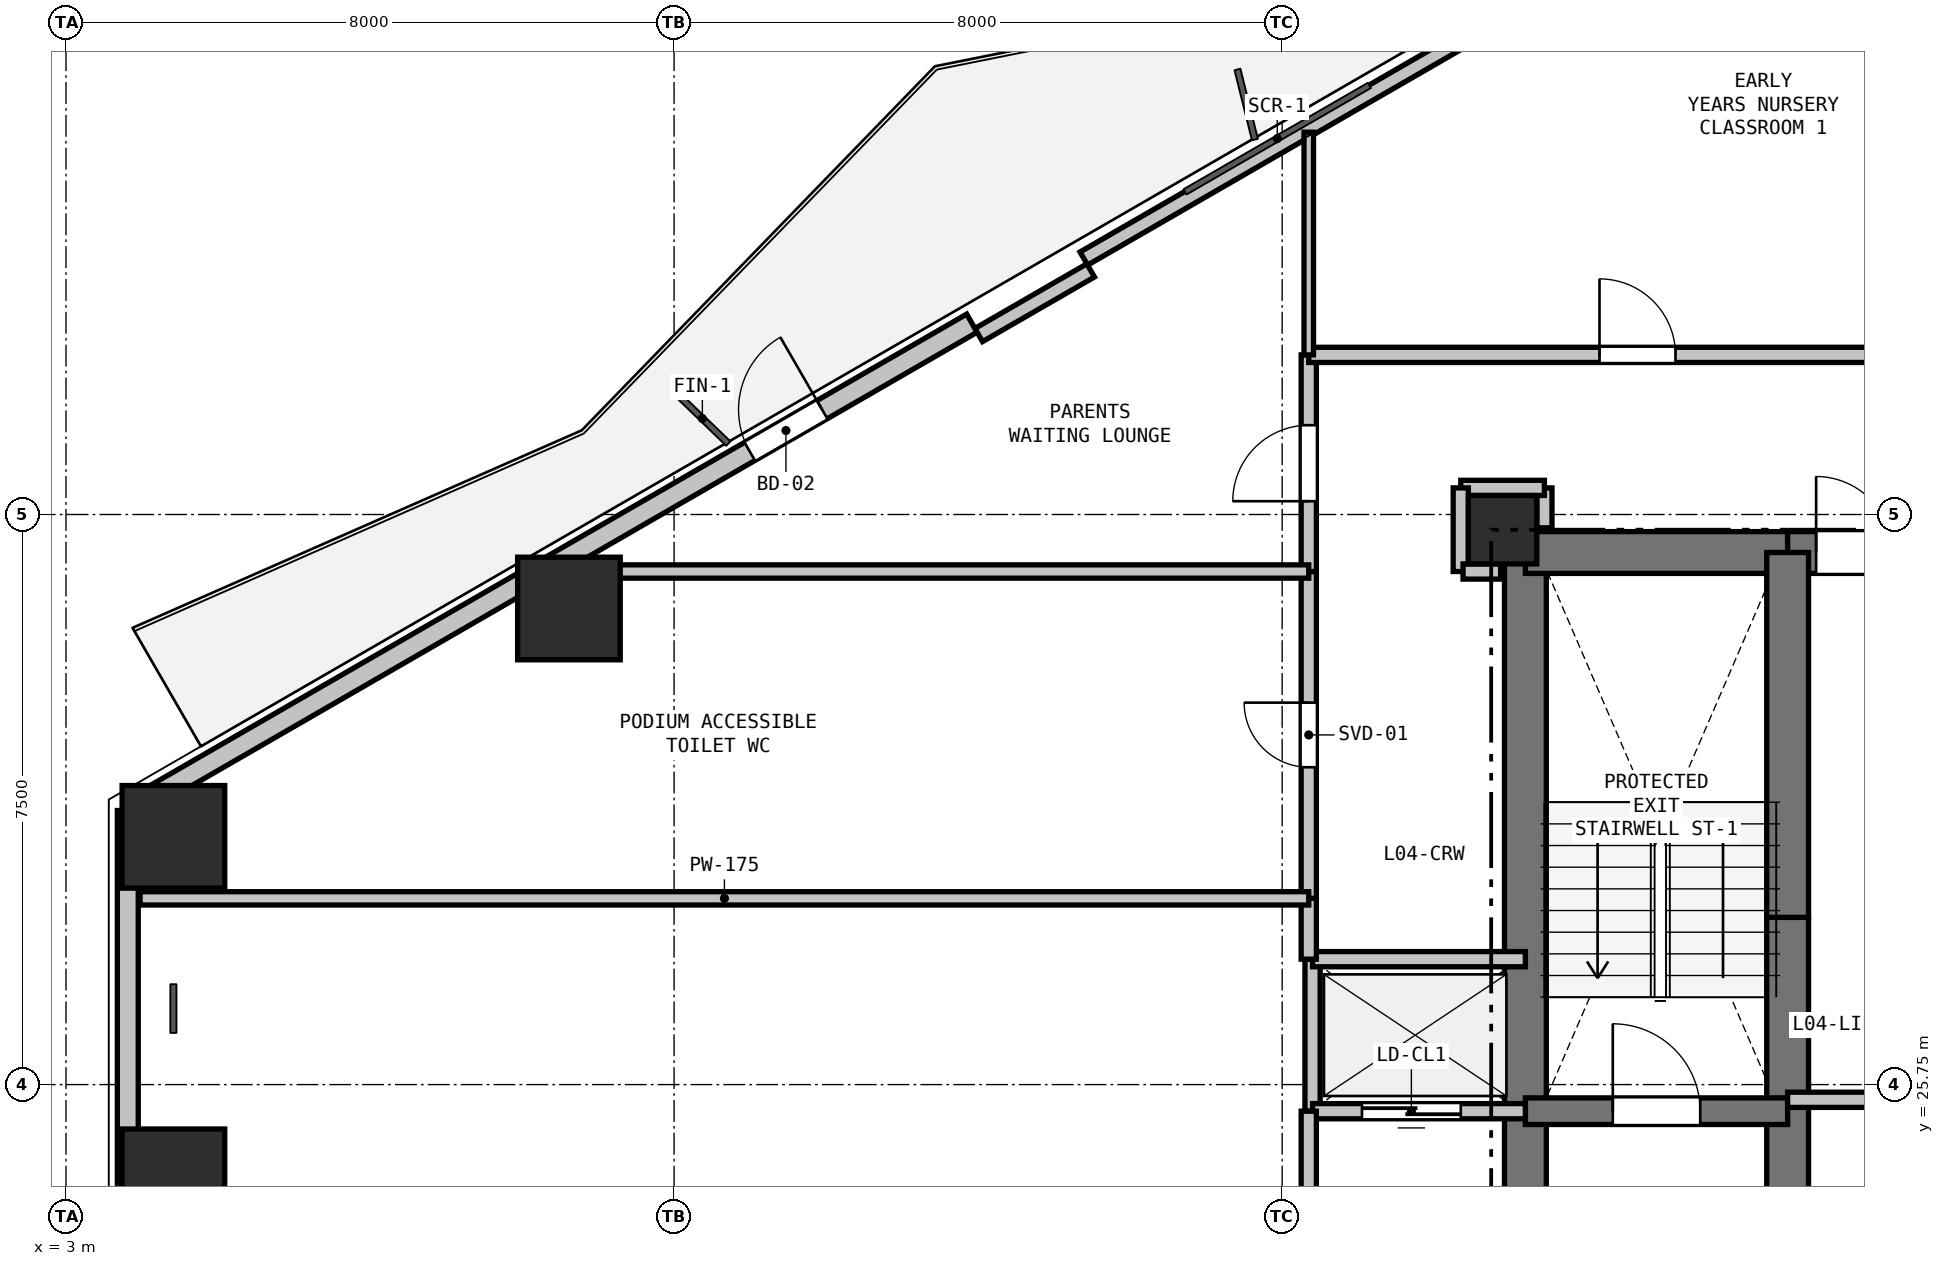
"""IFC4 building model, lengths in metres.
Left out: names, types, materials, properties, quantities, classifications, styles, units other than length and angle.
Written with IfcOpenShell. Run it as: python <this file> out.ifc"""

import sys

from ifc_helpers import new_model, si_unit, direction, frame, frame_2d, origin, origin_2d, place, context, subcontext, project, spatial, rectangle, hollow_rectangle, extrude, element, fill, save


model = new_model("IFC4")
c1 = context("Model", 3, precision=1e-05, world=origin(), true_north=direction((0.0, 1.0)))
c2 = subcontext(c1, "Body", "Model", "MODEL_VIEW")
j1 = project(units=[si_unit("LENGTHUNIT", "METRE"), si_unit("PLANEANGLEUNIT", "RADIAN")], contexts=[c1])
p1 = place(None, origin())
s1 = spatial("IfcSite", under=j1, at=p1, CompositionType="ELEMENT")
p2 = place(p1, origin())
s2 = spatial("IfcBuilding", under=s1, at=p2, CompositionType="ELEMENT")
p3 = place(p2, frame((0.0, 0.0, 19.2)))
s3 = spatial("IfcBuildingStorey", under=s2, at=p3, CompositionType="ELEMENT", Elevation=19.2)
p4 = place(p3, frame((21.9, 33.05, 0.0), z_axis=(0.0, 0.0, 1.0), x_axis=(1.0, 0.0, 0.0)))
e1 = element("IfcColumn", 1, at=p4, inside=s3, PredefinedType="COLUMN", context=c2, shape_type="SweptSolid", body=[
    extrude(rectangle(XDim=0.9, YDim=0.9, at=origin_2d()), origin(), (0.0, 0.0, 1.0), 3.3),
])
for number, where, z_axis, x_axis in (
    (2, (4.413, 29.009, 0.0), (0.0, 0.0, 1.0), (1.0, 0.0, 0.0)),
    (3, (9.617, 32.014, 0.0), (0.0, 0.0, 1.0), (1.0, 0.0, 0.0)),
    (4, (4.413, 24.491, 0.0), (0.0, 0.0, 1.0), (1.0, 0.0, 0.0)),
):
    element("IfcColumn", number, at=place(p3, frame(where, z_axis=z_axis, x_axis=x_axis)), inside=s3, PredefinedType="COLUMN", context=c2, shape_type="SweptSolid", body=[
        extrude(hollow_rectangle(XDim=1.35, YDim=1.35, WallThickness=0.036, at=origin_2d()), origin(), (0.0, 0.0, 1.0), 3.3),
    ])
p5 = place(p3, frame((3.813, 24.144, 0.0), z_axis=(0.0, 0.0, 1.0), x_axis=(0.0, 1.0, 0.0)))
e5 = element("IfcWall", 5, at=p5, inside=s3, PredefinedType="SOLIDWALL", context=c2, shape_type="SweptSolid", body=[
    extrude(rectangle(XDim=5.211, YDim=0.275, at=frame_2d((2.606, 0.0))), origin(), (0.0, 0.0, 1.0), 2.66),
])
p6 = place(p3, frame((3.943, 29.431, 0.0), z_axis=(0.0, 0.0, 1.0), x_axis=(0.866027105532, 0.499997052475, 0.0)))
e6 = element("IfcWall", 6, at=p6, inside=s3, PredefinedType="SOLIDWALL", context=c2, shape_type="SweptSolid", body=[
    extrude(rectangle(XDim=12.673, YDim=0.275, at=frame_2d((6.336, 0.0))), origin(), (0.0, 0.0, 1.0), 2.66),
])
p7 = place(p6, frame((9.298, 0.0, 0.0)))
e7 = element("IfcOpeningElement", 7, at=p7, cuts=e6, PredefinedType="OPENING", context=c2, shape_type="SweptSolid", body=[
    extrude(rectangle(XDim=1.1, YDim=2.1, at=frame_2d((0.55, 1.05))), frame((0.0, 0.147, 0.0), z_axis=(0.0, -1.0, 0.0), x_axis=(1.0, 0.0, 0.0)), (0.0, 0.0, 1.0), 0.295),
])
p8 = place(p3, frame((16.39, 36.617, 0.0), z_axis=(0.0, 0.0, 1.0), x_axis=(0.866027351828, 0.499996625875, 0.0)))
e8 = element("IfcWall", 8, at=p8, inside=s3, PredefinedType="PARAPET", context=c2, shape_type="SweptSolid", body=[
    extrude(rectangle(XDim=11.973, YDim=0.2, at=frame_2d((5.987, 0.0))), origin(), (0.0, 0.0, 1.0), 0.2),
])
p9 = place(p3, frame((15.008, 35.611, 0.0), z_axis=(0.0, 0.0, 1.0), x_axis=(0.86605165483, 0.499954529098, 0.0)))
e9 = element("IfcWall", 9, at=p9, inside=s3, PredefinedType="PARAPET", context=c2, shape_type="SweptSolid", body=[
    extrude(rectangle(XDim=1.7, YDim=0.2, at=frame_2d((0.85, 0.0))), origin(), (0.0, 0.0, 1.0), 2.66),
])
p10 = place(p3, frame((22.2, 20.75, 0.0), z_axis=(0.0, 0.0, 1.0), x_axis=(0.0, 1.0, 0.0)))
e10 = element("IfcWall", 10, at=p10, inside=s3, PredefinedType="SHEAR", context=c2, shape_type="SweptSolid", body=[
    extrude(rectangle(XDim=4.65, YDim=0.55, at=frame_2d((2.325, 0.0))), origin(), (0.0, 0.0, 1.0), 3.04),
])
p11 = place(p3, frame((22.2, 25.4, 0.0), z_axis=(0.0, 0.0, 1.0), x_axis=(0.0, 1.0, 0.0)))
e11 = element("IfcWall", 11, at=p11, inside=s3, PredefinedType="SHEAR", context=c2, shape_type="SweptSolid", body=[
    extrude(rectangle(XDim=7.35, YDim=0.55, at=frame_2d((3.675, 0.0))), origin(), (0.0, 0.0, 1.0), 3.04),
])
p12 = place(p3, frame((22.2, 32.75, 0.0), z_axis=(0.0, 0.0, 1.0), x_axis=(1.0, 0.0, 0.0)))
e12 = element("IfcWall", 12, at=p12, inside=s3, PredefinedType="SHEAR", context=c2, shape_type="SweptSolid", body=[
    extrude(rectangle(XDim=3.45, YDim=0.55, at=frame_2d((1.725, 0.0))), origin(), (0.0, 0.0, 1.0), 3.04),
])
p13 = place(p3, frame((25.65, 32.75, 0.0), z_axis=(0.0, 0.0, 1.0), x_axis=(1.0, 0.0, 0.0)))
e13 = element("IfcWall", 13, at=p13, inside=s3, PredefinedType="SHEAR", context=c2, shape_type="SweptSolid", body=[
    extrude(rectangle(XDim=1.75, YDim=0.55, at=frame_2d((0.875, 0.0))), origin(), (0.0, 0.0, 1.0), 3.04),
])
p14 = place(p13, frame((0.375, 0.0, 0.0)))
e14 = element("IfcOpeningElement", 14, at=p14, cuts=e13, PredefinedType="OPENING", context=c2, shape_type="SweptSolid", body=[
    extrude(rectangle(XDim=1.0, YDim=2.15, at=frame_2d((0.5, 1.075))), frame((0.0, 0.285, 0.0), z_axis=(0.0, -1.0, 0.0), x_axis=(1.0, 0.0, 0.0)), (0.0, 0.0, 1.0), 0.57),
])
p15 = place(p3, frame((25.65, 22.75, 0.0), z_axis=(0.0, 0.0, 1.0), x_axis=(0.0, 1.0, 0.0)))
e15 = element("IfcWall", 15, at=p15, inside=s3, PredefinedType="SHEAR", context=c2, shape_type="SweptSolid", body=[
    extrude(rectangle(XDim=2.8, YDim=0.55, at=frame_2d((1.4, 0.0))), origin(), (0.0, 0.0, 1.0), 3.04),
])
p16 = place(p3, frame((25.65, 25.55, 0.0), z_axis=(0.0, 0.0, 1.0), x_axis=(0.0, 1.0, 0.0)))
e16 = element("IfcWall", 16, at=p16, inside=s3, PredefinedType="SHEAR", context=c2, shape_type="SweptSolid", body=[
    extrude(rectangle(XDim=2.4, YDim=0.55, at=frame_2d((1.2, 0.0))), origin(), (0.0, 0.0, 1.0), 3.04),
])
p17 = place(p3, frame((25.65, 27.95, 0.0), z_axis=(0.0, 0.0, 1.0), x_axis=(0.0, 1.0, 0.0)))
e17 = element("IfcWall", 17, at=p17, inside=s3, PredefinedType="SHEAR", context=c2, shape_type="SweptSolid", body=[
    extrude(rectangle(XDim=4.8, YDim=0.55, at=frame_2d((2.4, 0.0))), origin(), (0.0, 0.0, 1.0), 3.04),
])
p18 = place(p3, frame((22.2, 25.4, 0.0), z_axis=(0.0, 0.0, 1.0), x_axis=(1.0, 0.0, 0.0)))
e18 = element("IfcWall", 18, at=p18, inside=s3, PredefinedType="SHEAR", context=c2, shape_type="SweptSolid", body=[
    extrude(rectangle(XDim=3.45, YDim=0.35, at=frame_2d((1.725, 0.0))), origin(), (0.0, 0.0, 1.0), 3.04),
])
p19 = place(p18, frame((1.15, 0.0, 0.0)))
e19 = element("IfcOpeningElement", 19, at=p19, cuts=e18, PredefinedType="OPENING", context=c2, shape_type="SweptSolid", body=[
    extrude(rectangle(XDim=1.15, YDim=2.15, at=frame_2d((0.575, 1.075))), frame((0.0, 0.185, 0.0), z_axis=(0.0, -1.0, 0.0), x_axis=(1.0, 0.0, 0.0)), (0.0, 0.0, 1.0), 0.37),
])
p20 = place(p3, frame((25.65, 25.55, 0.0), z_axis=(0.0, 0.0, 1.0), x_axis=(1.0, 0.0, 0.0)))
e20 = element("IfcWall", 20, at=p20, inside=s3, PredefinedType="PARTITIONING", context=c2, shape_type="SweptSolid", body=[
    extrude(rectangle(XDim=4.95, YDim=0.2, at=frame_2d((2.475, 0.0))), origin(), (0.0, 0.0, 1.0), 3.04),
])
p21 = place(p3, frame((19.4, 25.4, 0.0), z_axis=(0.0, 0.0, 1.0), x_axis=(0.0, 1.0, 0.0)))
e21 = element("IfcWall", 21, at=p21, inside=s3, PredefinedType="PARTITIONING", context=c2, shape_type="SweptSolid", body=[
    extrude(rectangle(XDim=2.0, YDim=0.2, at=frame_2d((1.0, 0.0))), origin(), (0.0, 0.0, 1.0), 3.04),
])
p22 = place(p3, frame((19.4, 27.4, 0.0), z_axis=(0.0, 0.0, 1.0), x_axis=(1.0, 0.0, 0.0)))
e22 = element("IfcWall", 22, at=p22, inside=s3, PredefinedType="PARTITIONING", context=c2, shape_type="SweptSolid", body=[
    extrude(rectangle(XDim=2.8, YDim=0.2, at=frame_2d((1.4, 0.0))), origin(), (0.0, 0.0, 1.0), 2.488),
])
p23 = place(p3, frame((22.2, 25.4, 0.0), z_axis=(0.0, 0.0, 1.0), x_axis=(-1.0, 0.0, 0.0)))
e23 = element("IfcWall", 23, at=p23, inside=s3, PredefinedType="PARTITIONING", context=c2, shape_type="SweptSolid", body=[
    extrude(rectangle(XDim=2.8, YDim=0.2, at=frame_2d((1.4, 0.0))), origin(), (0.0, 0.0, 1.0), 2.488),
])
p24 = place(p23, frame((0.85, 0.0, 0.0)))
e24 = element("IfcOpeningElement", 24, at=p24, cuts=e23, PredefinedType="OPENING", context=c2, shape_type="SweptSolid", body=[
    extrude(rectangle(XDim=1.3, YDim=2.2, at=frame_2d((0.65, 1.1))), frame((0.0, 0.11, 0.0), z_axis=(0.0, -1.0, 0.0), x_axis=(1.0, 0.0, 0.0)), (0.0, 0.0, 1.0), 0.22),
])
p25 = place(p3, frame((19.35, 22.2, 0.0), z_axis=(0.0, 0.0, 1.0), x_axis=(0.0, 1.0, 0.0)))
e25 = element("IfcWall", 25, at=p25, inside=s3, PredefinedType="PARTITIONING", context=c2, shape_type="SweptSolid", body=[
    extrude(rectangle(XDim=3.2, YDim=0.2, at=frame_2d((1.6, 0.0))), origin(), (0.0, 0.0, 1.0), 3.04),
])
p26 = place(p3, frame((19.35, 27.4, 0.0), z_axis=(0.0, 0.0, 1.0), x_axis=(0.0, 1.0, 0.0)))
e26 = element("IfcWall", 26, at=p26, inside=s3, PredefinedType="PARTITIONING", context=c2, shape_type="SweptSolid", body=[
    extrude(rectangle(XDim=0.8, YDim=0.2, at=frame_2d((0.4, 0.0))), origin(), (0.0, 0.0, 1.0), 3.04),
])
p27 = place(p3, frame((19.35, 28.2, 0.0), z_axis=(0.0, 0.0, 1.0), x_axis=(0.0, 1.0, 0.0)))
e27 = element("IfcWall", 27, at=p27, inside=s3, PredefinedType="PARTITIONING", context=c2, shape_type="SweptSolid", body=[
    extrude(rectangle(XDim=4.3, YDim=0.2, at=frame_2d((2.15, 0.0))), origin(), (0.0, 0.0, 1.0), 3.04),
])
p28 = place(p27, frame((1.725, 0.0, 0.0)))
e28 = element("IfcOpeningElement", 28, at=p28, cuts=e27, PredefinedType="OPENING", context=c2, shape_type="SweptSolid", body=[
    extrude(rectangle(XDim=0.85, YDim=2.1, at=frame_2d((0.425, 1.05))), frame((0.0, 0.11, 0.0), z_axis=(0.0, -1.0, 0.0), x_axis=(1.0, 0.0, 0.0)), (0.0, 0.0, 1.0), 0.22),
])
p29 = place(p3, frame((19.35, 32.5, 0.0), z_axis=(0.0, 0.0, 1.0), x_axis=(0.0, 1.0, 0.0)))
e29 = element("IfcWall", 29, at=p29, inside=s3, PredefinedType="PARTITIONING", context=c2, shape_type="SweptSolid", body=[
    extrude(rectangle(XDim=2.85, YDim=0.2, at=frame_2d((1.425, 0.0))), origin(), (0.0, 0.0, 1.0), 2.338),
])
p30 = place(p29, frame((0.925, 0.0, 0.0)))
e30 = element("IfcOpeningElement", 30, at=p30, cuts=e29, PredefinedType="OPENING", context=c2, shape_type="SweptSolid", body=[
    extrude(rectangle(XDim=1.0, YDim=2.15, at=frame_2d((0.5, 1.075))), frame((0.0, 0.11, 0.0), z_axis=(0.0, -1.0, 0.0), x_axis=(1.0, 0.0, 0.0)), (0.0, 0.0, 1.0), 0.22),
])
p31 = place(p3, frame((19.35, 35.35, 0.0), z_axis=(0.0, 0.0, 1.0), x_axis=(1.0, 0.0, 0.0)))
e31 = element("IfcWall", 31, at=p31, inside=s3, PredefinedType="PARTITIONING", context=c2, shape_type="SweptSolid", body=[
    extrude(rectangle(XDim=8.65, YDim=0.2, at=frame_2d((4.325, 0.0))), origin(), (0.0, 0.0, 1.0), 3.04),
])
p32 = place(p31, frame((3.825, 0.0, 0.0)))
e32 = element("IfcOpeningElement", 32, at=p32, cuts=e31, PredefinedType="OPENING", context=c2, shape_type="SweptSolid", body=[
    extrude(rectangle(XDim=1.0, YDim=2.15, at=frame_2d((0.5, 1.075))), frame((0.0, 0.11, 0.0), z_axis=(0.0, -1.0, 0.0), x_axis=(1.0, 0.0, 0.0)), (0.0, 0.0, 1.0), 0.22),
])
p33 = place(p3, frame((22.45, 33.075, 0.0), z_axis=(0.0, 0.0, 1.0), x_axis=(0.0, 1.0, 0.0)))
e33 = element("IfcWall", 33, at=p33, inside=s3, PredefinedType="PARTITIONING", context=c2, shape_type="SweptSolid", body=[
    extrude(rectangle(XDim=0.525, YDim=0.2, at=frame_2d((0.263, 0.0))), origin(), (0.0, 0.0, 1.0), 2.488),
])
p34 = place(p3, frame((22.45, 33.6, 0.0), z_axis=(0.0, 0.0, 1.0), x_axis=(-1.0, 0.0, 0.0)))
e34 = element("IfcWall", 34, at=p34, inside=s3, PredefinedType="PARTITIONING", context=c2, shape_type="SweptSolid", body=[
    extrude(rectangle(XDim=1.1, YDim=0.2, at=frame_2d((0.55, 0.0))), origin(), (0.0, 0.0, 1.0), 3.04),
])
p35 = place(p3, frame((21.35, 33.6, 0.0), z_axis=(0.0, 0.0, 1.0), x_axis=(0.0, -1.0, 0.0)))
e35 = element("IfcWall", 35, at=p35, inside=s3, PredefinedType="PARTITIONING", context=c2, shape_type="SweptSolid", body=[
    extrude(rectangle(XDim=1.1, YDim=0.2, at=frame_2d((0.55, 0.0))), origin(), (0.0, 0.0, 1.0), 2.338),
])
p36 = place(p3, frame((21.38, 32.5, 0.0), z_axis=(0.0, 0.0, 1.0), x_axis=(1.0, 0.0, 0.0)))
e36 = element("IfcWall", 36, at=p36, inside=s3, PredefinedType="PARTITIONING", context=c2, shape_type="SweptSolid", body=[
    extrude(rectangle(XDim=0.495, YDim=0.2, at=frame_2d((0.248, 0.0))), origin(), (0.0, 0.0, 1.0), 2.488),
])
p37 = place(p3, frame((9.553, 32.5, 0.0), z_axis=(0.0, 0.0, 1.0), x_axis=(1.0, 0.0, 0.0)))
e37 = element("IfcWall", 37, at=p37, inside=s3, PredefinedType="PLUMBINGWALL", context=c2, shape_type="SweptSolid", body=[
    extrude(rectangle(XDim=9.797, YDim=0.175, at=frame_2d((4.899, 0.0))), origin(), (0.0, 0.0, 1.0), 2.338),
])
p38 = place(p3, frame((19.35, 28.2, 0.0), z_axis=(0.0, 0.0, 1.0), x_axis=(-1.0, 0.0, 0.0)))
e38 = element("IfcWall", 38, at=p38, inside=s3, PredefinedType="PLUMBINGWALL", context=c2, shape_type="SweptSolid", body=[
    extrude(rectangle(XDim=15.375, YDim=0.175, at=frame_2d((7.688, 0.0))), origin(), (0.0, 0.0, 1.0), 2.65),
])
p39 = place(p3, frame((3.813, 29.356, 0.0), z_axis=(0.0, 0.0, 1.0), x_axis=(0.866131372301, 0.499816412211, 0.0)))
e39 = element("IfcWall", 39, at=p39, inside=s3, PredefinedType="PLUMBINGWALL", context=c2, shape_type="SweptSolid", body=[
    extrude(rectangle(XDim=0.15, YDim=0.175, at=frame_2d((0.075, 0.0))), origin(), (0.0, 0.0, 1.0), 3.04),
])
p40 = place(p3, frame((19.35, 35.35, 0.0), z_axis=(0.0, 0.0, 1.0), x_axis=(0.0, 1.0, 0.0)))
e40 = element("IfcWall", 40, at=p40, inside=s3, PredefinedType="PARTITIONING", context=c2, shape_type="SweptSolid", body=[
    extrude(rectangle(XDim=2.93, YDim=0.125, at=frame_2d((1.465, 0.0))), origin(), (0.0, 0.0, 1.0), 2.365),
])
p41 = place(p7, origin())
e41 = element("IfcDoor", 41, at=p41, inside=s3, OperationType="SINGLE_SWING_RIGHT", PredefinedType="DOOR", context=c2, shape_type="SweptSolid", body=[
    extrude(rectangle(XDim=1.1, YDim=2.1, at=frame_2d((0.55, 1.05))), frame((0.0, 0.025, 0.0), z_axis=(0.0, -1.0, 0.0), x_axis=(1.0, 0.0, 0.0)), (0.0, 0.0, 1.0), 0.05),
])
fill(e7, e41)
p42 = place(p14, origin())
e42 = element("IfcDoor", 42, at=p42, inside=s3, OperationType="SINGLE_SWING_LEFT", PredefinedType="DOOR", context=c2, shape_type="SweptSolid", body=[
    extrude(rectangle(XDim=1.0, YDim=2.15, at=frame_2d((0.5, 1.075))), frame((0.0, 0.025, 0.0), z_axis=(0.0, -1.0, 0.0), x_axis=(1.0, 0.0, 0.0)), (0.0, 0.0, 1.0), 0.05),
])
fill(e14, e42)
p43 = place(p24, origin())
e43 = element("IfcDoor", 43, at=p43, inside=s3, OperationType="SLIDING_TO_LEFT", PredefinedType="DOOR", context=c2, shape_type="SweptSolid", body=[
    extrude(rectangle(XDim=1.3, YDim=2.2, at=frame_2d((0.65, 1.1))), frame((0.0, 0.025, 0.0), z_axis=(0.0, -1.0, 0.0), x_axis=(1.0, 0.0, 0.0)), (0.0, 0.0, 1.0), 0.05),
])
fill(e24, e43)
p44 = place(p19, origin())
e44 = element("IfcDoor", 44, at=p44, inside=s3, OperationType="SINGLE_SWING_LEFT", PredefinedType="DOOR", context=c2, shape_type="SweptSolid", body=[
    extrude(rectangle(XDim=1.15, YDim=2.15, at=frame_2d((0.575, 1.075))), frame((0.0, 0.025, 0.0), z_axis=(0.0, -1.0, 0.0), x_axis=(1.0, 0.0, 0.0)), (0.0, 0.0, 1.0), 0.05),
])
fill(e19, e44)
p45 = place(p28, origin())
e45 = element("IfcDoor", 45, at=p45, inside=s3, OperationType="SINGLE_SWING_RIGHT", PredefinedType="DOOR", context=c2, shape_type="SweptSolid", body=[
    extrude(rectangle(XDim=0.85, YDim=2.1, at=frame_2d((0.425, 1.05))), frame((0.0, 0.025, 0.0), z_axis=(0.0, -1.0, 0.0), x_axis=(1.0, 0.0, 0.0)), (0.0, 0.0, 1.0), 0.05),
])
fill(e28, e45)
p46 = place(p32, origin())
e46 = element("IfcDoor", 46, at=p46, inside=s3, OperationType="SINGLE_SWING_LEFT", PredefinedType="DOOR", context=c2, shape_type="SweptSolid", body=[
    extrude(rectangle(XDim=1.0, YDim=2.15, at=frame_2d((0.5, 1.075))), frame((0.0, 0.025, 0.0), z_axis=(0.0, -1.0, 0.0), x_axis=(1.0, 0.0, 0.0)), (0.0, 0.0, 1.0), 0.05),
])
fill(e32, e46)
p47 = place(p30, origin())
e47 = element("IfcDoor", 47, at=p47, inside=s3, OperationType="SINGLE_SWING_LEFT", PredefinedType="DOOR", context=c2, shape_type="SweptSolid", body=[
    extrude(rectangle(XDim=1.0, YDim=2.15, at=frame_2d((0.5, 1.075))), frame((0.0, 0.025, 0.0), z_axis=(0.0, -1.0, 0.0), x_axis=(1.0, 0.0, 0.0)), (0.0, 0.0, 1.0), 0.05),
])
fill(e30, e47)
save(model, sys.argv[1])
